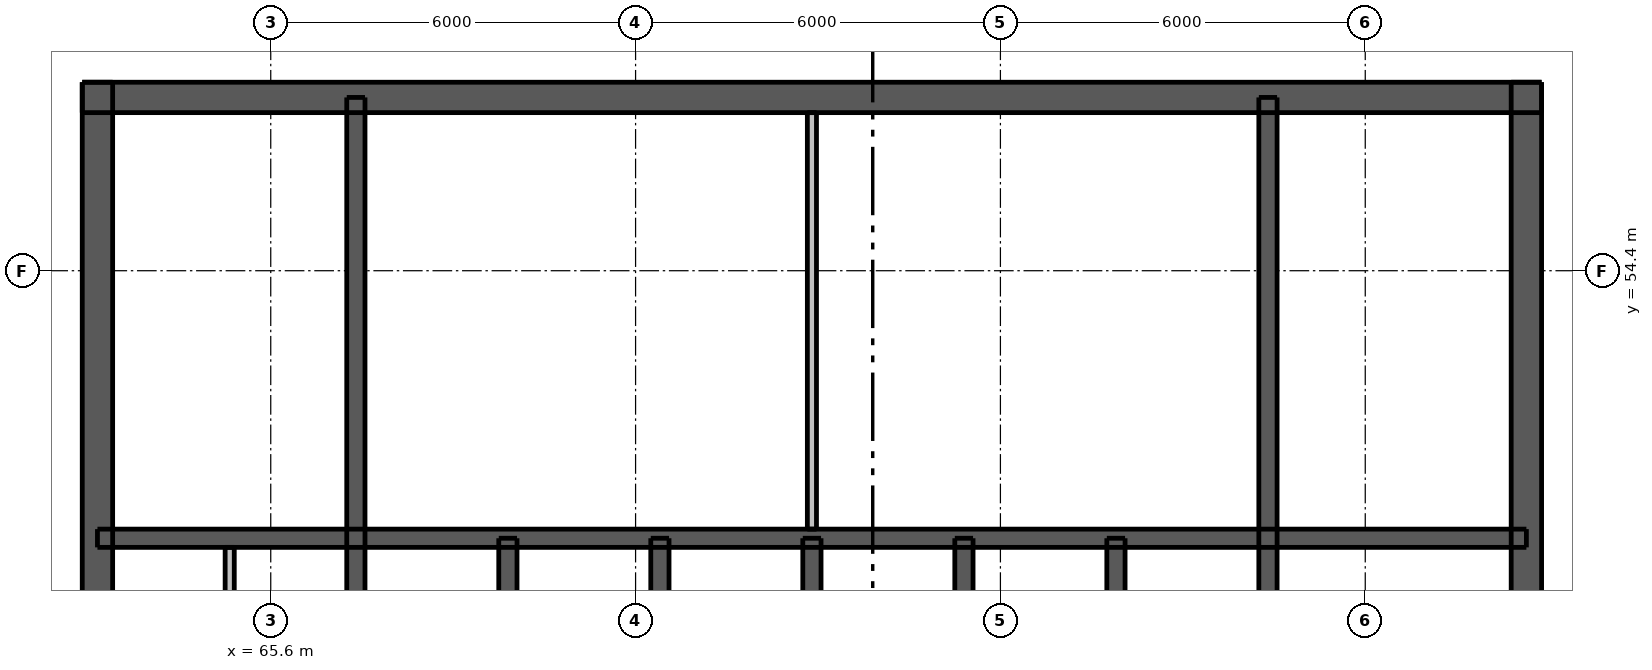
"""IFC4 building model, lengths in metres.
Left out: names, types, materials, properties, quantities, classifications, styles, units other than length and angle.
Written with IfcOpenShell. Run it as: python <this file> out.ifc"""

import sys

from ifc_helpers import new_model, si_unit, direction, frame, frame_2d, origin, place, context, subcontext, project, spatial, rectangle, extrude, element, fill, save


model = new_model("IFC4")
c1 = context("Model", 3, precision=1e-05, world=origin(), true_north=direction((0.0, 1.0)))
c2 = subcontext(c1, "Body", "Model", "MODEL_VIEW")
j1 = project(units=[si_unit("LENGTHUNIT", "METRE"), si_unit("PLANEANGLEUNIT", "RADIAN")], contexts=[c1])
p1 = place(None, origin())
s1 = spatial("IfcSite", under=j1, at=p1, CompositionType="ELEMENT")
p2 = place(p1, origin())
s2 = spatial("IfcBuilding", under=s1, at=p2, CompositionType="ELEMENT")
p3 = place(p2, frame((0.0, 0.0, 238.9)))
s3 = spatial("IfcBuildingStorey", under=s2, at=p3, CompositionType="ELEMENT", Elevation=238.9)
p4 = place(p3, frame((62.5, 57.25, 0.0), z_axis=(0.0, 0.0, 1.0), x_axis=(1.0, 0.0, 0.0)))
e1 = element("IfcWall", 1, at=p4, inside=s3, PredefinedType="SHEAR", context=c2, shape_type="SweptSolid", body=[
    extrude(rectangle(XDim=24.0, YDim=0.5, at=frame_2d((12.0, 0.0))), origin(), (0.0, 0.0, 1.0), 3.05),
])
p5 = place(p4, frame((21.025, 0.0, 0.0)))
e2 = element("IfcOpeningElement", 2, at=p5, cuts=e1, PredefinedType="OPENING", context=c2, shape_type="SweptSolid", body=[
    extrude(rectangle(XDim=1.1, YDim=2.1, at=frame_2d((0.55, 1.05))), frame((0.0, 0.26, 0.0), z_axis=(0.0, -1.0, 0.0), x_axis=(1.0, 0.0, 0.0)), (0.0, 0.0, 1.0), 0.52),
])
p6 = place(p4, frame((1.875, 0.0, 0.0)))
e3 = element("IfcOpeningElement", 3, at=p6, cuts=e1, PredefinedType="OPENING", context=c2, shape_type="SweptSolid", body=[
    extrude(rectangle(XDim=1.1, YDim=2.1, at=frame_2d((0.55, 1.05))), frame((0.0, 0.26, 0.0), z_axis=(0.0, -1.0, 0.0), x_axis=(1.0, 0.0, 0.0)), (0.0, 0.0, 1.0), 0.52),
])
p7 = place(p4, frame((7.875, 0.0, 0.0)))
e4 = element("IfcOpeningElement", 4, at=p7, cuts=e1, PredefinedType="OPENING", context=c2, shape_type="SweptSolid", body=[
    extrude(rectangle(XDim=0.9, YDim=2.1, at=frame_2d((0.45, 1.05))), frame((0.0, 0.26, 0.0), z_axis=(0.0, -1.0, 0.0), x_axis=(1.0, 0.0, 0.0)), (0.0, 0.0, 1.0), 0.52),
])
p8 = place(p4, frame((15.225, 0.0, 0.0)))
e5 = element("IfcOpeningElement", 5, at=p8, cuts=e1, PredefinedType="OPENING", context=c2, shape_type="SweptSolid", body=[
    extrude(rectangle(XDim=0.9, YDim=2.1, at=frame_2d((0.45, 1.05))), frame((0.0, 0.26, 0.0), z_axis=(0.0, -1.0, 0.0), x_axis=(1.0, 0.0, 0.0)), (0.0, 0.0, 1.0), 0.52),
])
p9 = place(p3, frame((62.75, 33.5, 0.0), z_axis=(0.0, 0.0, 1.0), x_axis=(0.0, 1.0, 0.0)))
e6 = element("IfcWall", 6, at=p9, inside=s3, PredefinedType="SHEAR", context=c2, shape_type="SweptSolid", body=[
    extrude(rectangle(XDim=24.0, YDim=0.5, at=frame_2d((12.0, 0.0))), origin(), (0.0, 0.0, 1.0), 3.05),
])
p10 = place(p9, frame((11.2, 0.0, 0.0)))
e7 = element("IfcOpeningElement", 7, at=p10, cuts=e6, PredefinedType="OPENING", context=c2, shape_type="SweptSolid", body=[
    extrude(rectangle(XDim=1.6, YDim=2.1, at=frame_2d((0.8, 1.05))), frame((0.0, 0.26, 0.0), z_axis=(0.0, -1.0, 0.0), x_axis=(1.0, 0.0, 0.0)), (0.0, 0.0, 1.0), 0.52),
])
p11 = place(p3, frame((86.25, 33.5, 0.0), z_axis=(0.0, 0.0, 1.0), x_axis=(0.0, 1.0, 0.0)))
e8 = element("IfcWall", 8, at=p11, inside=s3, PredefinedType="SHEAR", context=c2, shape_type="SweptSolid", body=[
    extrude(rectangle(XDim=24.0, YDim=0.5, at=frame_2d((12.0, 0.0))), origin(), (0.0, 0.0, 1.0), 3.05),
])
p12 = place(p11, frame((11.2, 0.0, 0.0)))
e9 = element("IfcOpeningElement", 9, at=p12, cuts=e8, PredefinedType="OPENING", context=c2, shape_type="SweptSolid", body=[
    extrude(rectangle(XDim=1.6, YDim=2.1, at=frame_2d((0.8, 1.05))), frame((0.0, 0.26, 0.0), z_axis=(0.0, -1.0, 0.0), x_axis=(1.0, 0.0, 0.0)), (0.0, 0.0, 1.0), 0.52),
])
p13 = place(p3, frame((62.75, 50.0, 0.0), z_axis=(0.0, 0.0, 1.0), x_axis=(1.0, 0.0, 0.0)))
e10 = element("IfcWall", 10, at=p13, inside=s3, PredefinedType="SHEAR", context=c2, shape_type="SweptSolid", body=[
    extrude(rectangle(XDim=23.5, YDim=0.3, at=frame_2d((11.75, 0.0))), origin(), (0.0, 0.0, 1.0), 3.05),
])
for number, where, z_axis, x_axis in (
    (11, (67.0, 47.1, 0.0), (0.0, 0.0, 1.0), (0.0, 1.0, 0.0)),
    (12, (82.0, 47.1, 0.0), (0.0, 0.0, 1.0), (0.0, 1.0, 0.0)),
):
    element("IfcWall", number, at=place(p3, frame(where, z_axis=z_axis, x_axis=x_axis)), inside=s3, PredefinedType="SHEAR", context=c2, shape_type="SweptSolid", body=[
        extrude(rectangle(XDim=10.15, YDim=0.3, at=frame_2d((5.075, 0.0))), origin(), (0.0, 0.0, 1.0), 3.05),
    ])
for number, where, z_axis, x_axis in (
    (13, (69.5, 47.1, 0.0), (0.0, 0.0, 1.0), (0.0, 1.0, 0.0)),
    (14, (72.0, 47.1, 0.0), (0.0, 0.0, 1.0), (0.0, 1.0, 0.0)),
    (15, (74.5, 47.1, 0.0), (0.0, 0.0, 1.0), (0.0, 1.0, 0.0)),
    (16, (77.0, 47.1, 0.0), (0.0, 0.0, 1.0), (0.0, 1.0, 0.0)),
    (17, (79.5, 47.1, 0.0), (0.0, 0.0, 1.0), (0.0, 1.0, 0.0)),
):
    element("IfcWall", number, at=place(p3, frame(where, z_axis=z_axis, x_axis=x_axis)), inside=s3, PredefinedType="SHEAR", context=c2, shape_type="SweptSolid", body=[
        extrude(rectangle(XDim=2.9, YDim=0.3, at=frame_2d((1.45, 0.0))), origin(), (0.0, 0.0, 1.0), 3.05),
    ])
p14 = place(p3, frame((64.925, 47.25, 0.0), z_axis=(0.0, 0.0, 1.0), x_axis=(0.0, 1.0, 0.0)))
e18 = element("IfcWall", 18, at=p14, inside=s3, PredefinedType="PLUMBINGWALL", context=c2, shape_type="SweptSolid", body=[
    extrude(rectangle(XDim=2.6, YDim=0.15, at=frame_2d((1.3, 0.0))), origin(), (0.0, 0.0, 1.0), 3.05),
])
p15 = place(p3, frame((74.5, 50.15, 0.0), z_axis=(0.0, 0.0, 1.0), x_axis=(0.0, 1.0, 0.0)))
e19 = element("IfcWall", 19, at=p15, inside=s3, PredefinedType="PLUMBINGWALL", context=c2, shape_type="SweptSolid", body=[
    extrude(rectangle(XDim=6.85, YDim=0.15, at=frame_2d((3.425, 0.0))), origin(), (0.0, 0.0, 1.0), 3.05),
])
p16 = place(p5, origin())
e20 = element("IfcDoor", 20, at=p16, inside=s3, OperationType="SINGLE_SWING_RIGHT", PredefinedType="DOOR", context=c2, shape_type="SweptSolid", body=[
    extrude(rectangle(XDim=1.1, YDim=2.1, at=frame_2d((0.55, 1.05))), frame((0.0, -0.188, 0.0), z_axis=(0.0, -1.0, 0.0), x_axis=(1.0, 0.0, 0.0)), (0.0, 0.0, 1.0), 0.05),
])
fill(e2, e20)
p17 = place(p6, origin())
e21 = element("IfcDoor", 21, at=p17, inside=s3, OperationType="SINGLE_SWING_LEFT", PredefinedType="DOOR", context=c2, shape_type="SweptSolid", body=[
    extrude(rectangle(XDim=1.1, YDim=2.1, at=frame_2d((0.55, 1.05))), frame((0.0, -0.188, 0.0), z_axis=(0.0, -1.0, 0.0), x_axis=(1.0, 0.0, 0.0)), (0.0, 0.0, 1.0), 0.05),
])
fill(e3, e21)
p18 = place(p7, origin())
e22 = element("IfcDoor", 22, at=p18, inside=s3, OperationType="SINGLE_SWING_RIGHT", PredefinedType="DOOR", context=c2, shape_type="SweptSolid", body=[
    extrude(rectangle(XDim=0.9, YDim=2.1, at=frame_2d((0.45, 1.05))), frame((0.0, -0.188, 0.0), z_axis=(0.0, -1.0, 0.0), x_axis=(1.0, 0.0, 0.0)), (0.0, 0.0, 1.0), 0.05),
])
fill(e4, e22)
p19 = place(p8, origin())
e23 = element("IfcDoor", 23, at=p19, inside=s3, OperationType="SINGLE_SWING_RIGHT", PredefinedType="DOOR", context=c2, shape_type="SweptSolid", body=[
    extrude(rectangle(XDim=0.9, YDim=2.1, at=frame_2d((0.45, 1.05))), frame((0.0, -0.188, 0.0), z_axis=(0.0, -1.0, 0.0), x_axis=(1.0, 0.0, 0.0)), (0.0, 0.0, 1.0), 0.05),
])
fill(e5, e23)
save(model, sys.argv[1])
